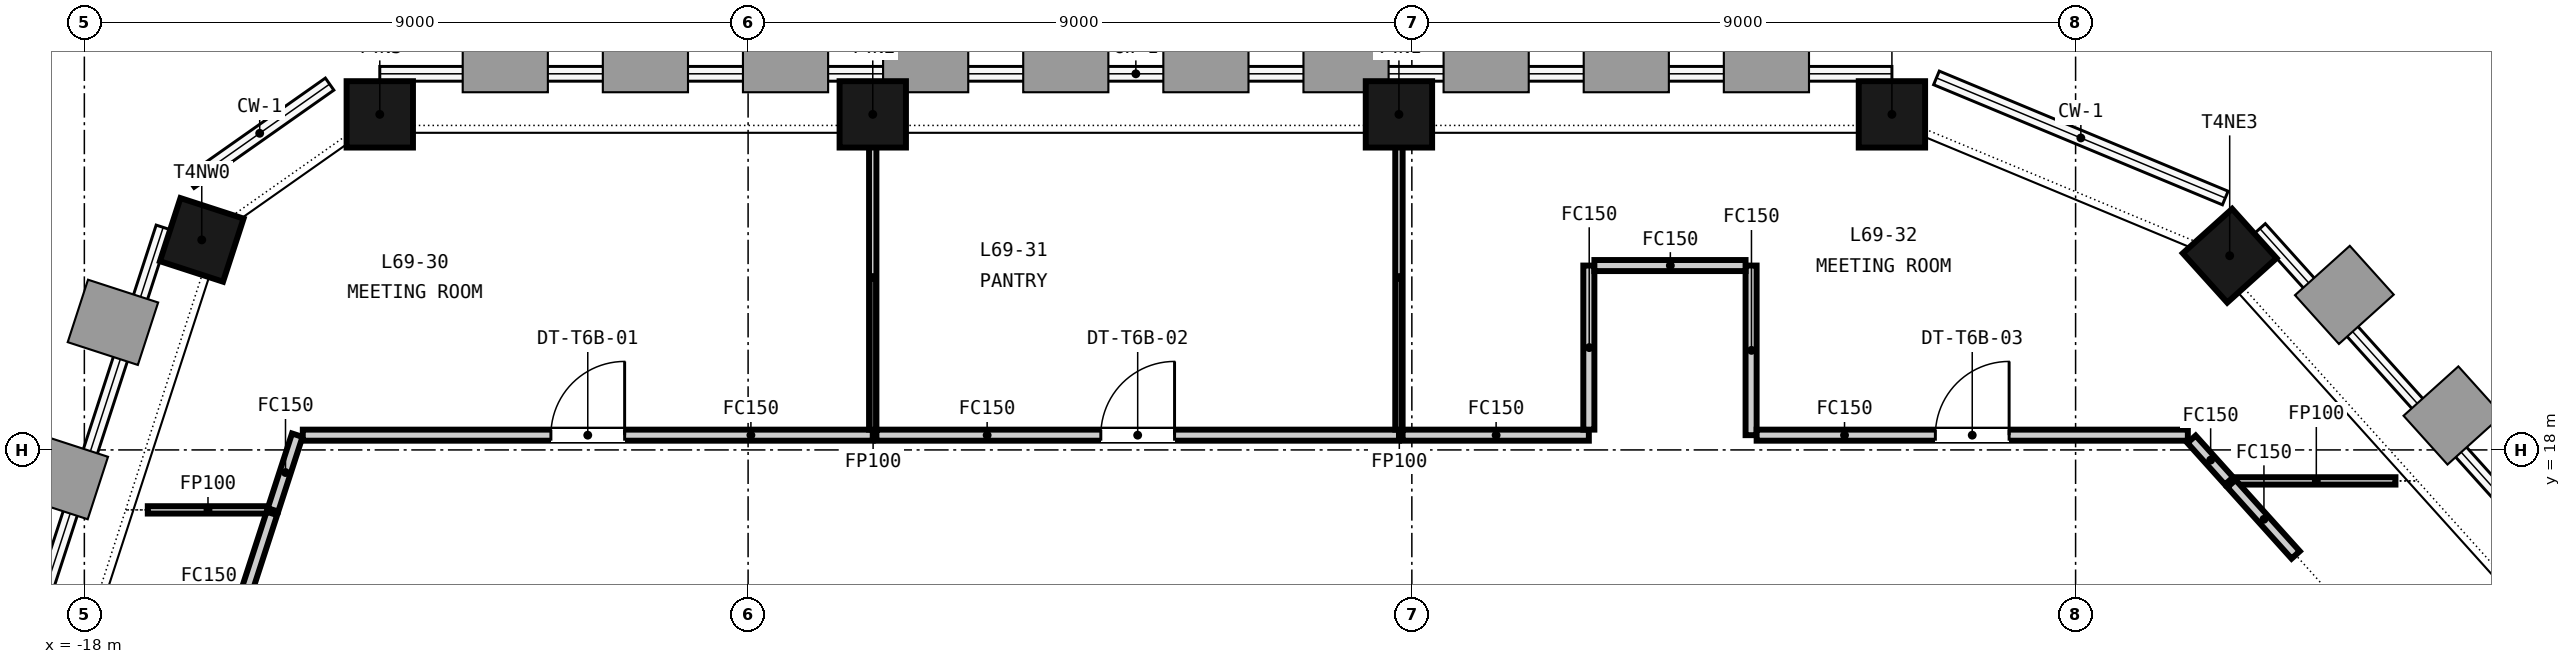
"""IFC4 building model, lengths in metres.
Left out: names, types, materials, properties, quantities, classifications, styles, units other than length and angle.
Written with IfcOpenShell. Run it as: python <this file> out.ifc"""

import sys

from ifc_helpers import new_model, si_unit, direction, frame, frame_2d, origin, origin_2d, place, context, subcontext, project, spatial, rectangle, extrude, element, fill, save


model = new_model("IFC4")
c1 = context("Model", 3, precision=1e-05, world=origin(), true_north=direction((0.0, 1.0)))
c2 = subcontext(c1, "Body", "Model", "MODEL_VIEW")
j1 = project(units=[si_unit("LENGTHUNIT", "METRE"), si_unit("PLANEANGLEUNIT", "RADIAN")], contexts=[c1])
p1 = place(None, origin())
s1 = spatial("IfcSite", under=j1, at=p1, CompositionType="ELEMENT")
p2 = place(p1, origin())
s2 = spatial("IfcBuilding", under=s1, at=p2, CompositionType="ELEMENT")
p3 = place(p2, frame((0.0, 0.0, 271.9)))
s3 = spatial("IfcBuildingStorey", under=s2, at=p3, CompositionType="ELEMENT", Elevation=271.9)
for number, where, z_axis, x_axis in (
    (1, (6.51, 22.55, -0.15), (0.0, 0.0, 1.0), (-1.0, 0.0, 0.0)),
    (2, (-0.175, 22.55, -0.15), (0.0, 0.0, 1.0), (-1.0, 0.0, 0.0)),
    (3, (-7.31, 22.55, -0.15), (0.0, 0.0, 1.0), (-1.0, 0.0, 0.0)),
    (4, (-13.994, 22.55, -0.15), (0.0, 0.0, 1.0), (-1.0, 0.0, 0.0)),
    (5, (-16.408, 20.848, -0.15), (0.0, 0.0, 1.0), (-0.309, -0.951, 0.0)),
    (6, (11.089, 20.633, -0.15), (0.0, 0.0, 1.0), (-0.669, 0.743, 0.0)),
):
    element("IfcColumn", number, at=place(p3, frame(where, z_axis=z_axis, x_axis=x_axis)), inside=s3, PredefinedType="COLUMN", context=c2, shape_type="SweptSolid", body=[
        extrude(rectangle(XDim=0.9, YDim=0.9, at=origin_2d()), origin(), (0.0, 0.0, 1.0), 3.65),
    ])
p4 = place(p3, frame((4.6, 20.5, 0.0), z_axis=(0.0, 0.0, 1.0), x_axis=(0.0, -1.0, 0.0)))
e7 = element("IfcWall", 7, at=p4, inside=s3, PredefinedType="PARTITIONING", context=c2, shape_type="SweptSolid", body=[
    extrude(rectangle(XDim=2.3, YDim=0.15, at=frame_2d((1.15, 0.0))), origin(), (0.0, 0.0, 1.0), 2.751),
])
p5 = place(p3, frame((-15.442, 17.187, 0.0), z_axis=(0.0, 0.0, 1.0), x_axis=(0.308790594164, 0.951130048393, 0.0)))
e8 = element("IfcWall", 8, at=p5, inside=s3, PredefinedType="PARTITIONING", context=c2, shape_type="SweptSolid", body=[
    extrude(rectangle(XDim=1.065, YDim=0.15, at=frame_2d((0.532, 0.0))), origin(), (0.0, 0.0, 1.0), 2.751),
])
p6 = place(p3, frame((-15.038, 18.2, 0.0), z_axis=(0.0, 0.0, 1.0), x_axis=(1.0, 0.0, 0.0)))
e9 = element("IfcWall", 9, at=p6, inside=s3, PredefinedType="PARTITIONING", context=c2, shape_type="SweptSolid", body=[
    extrude(rectangle(XDim=7.728, YDim=0.15, at=frame_2d((3.864, 0.0))), origin(), (0.0, 0.0, 1.0), 2.751),
])
p7 = place(p6, frame((3.364, 0.0, 0.0)))
e10 = element("IfcOpeningElement", 10, at=p7, cuts=e9, PredefinedType="OPENING", context=c2, shape_type="SweptSolid", body=[
    extrude(rectangle(XDim=1.0, YDim=2.1, at=frame_2d((0.5, 1.05))), frame((0.0, 0.085, 0.0), z_axis=(0.0, -1.0, 0.0), x_axis=(1.0, 0.0, 0.0)), (0.0, 0.0, 1.0), 0.17),
])
p8 = place(p3, frame((-7.31, 18.275, 0.0), z_axis=(0.0, 0.0, 1.0), x_axis=(0.0, 1.0, 0.0)))
e11 = element("IfcWall", 11, at=p8, inside=s3, PredefinedType="PARTITIONING", context=c2, shape_type="SweptSolid", body=[
    extrude(rectangle(XDim=4.125, YDim=0.1, at=frame_2d((2.062, 0.0))), origin(), (0.0, 0.0, 1.0), 2.751),
])
p9 = place(p3, frame((-17.14, 17.187, 0.0), z_axis=(0.0, 0.0, 1.0), x_axis=(1.0, 0.0, 0.0)))
e12 = element("IfcWall", 12, at=p9, inside=s3, PredefinedType="PARTITIONING", context=c2, shape_type="SweptSolid", body=[
    extrude(rectangle(XDim=1.623, YDim=0.1, at=frame_2d((0.812, 0.0))), origin(), (0.0, 0.0, 1.0), 2.751),
])
p10 = place(p3, frame((-7.26, 18.2, 0.0), z_axis=(0.0, 0.0, 1.0), x_axis=(1.0, 0.0, 0.0)))
e13 = element("IfcWall", 13, at=p10, inside=s3, PredefinedType="PARTITIONING", context=c2, shape_type="SweptSolid", body=[
    extrude(rectangle(XDim=7.085, YDim=0.15, at=frame_2d((3.542, 0.0))), origin(), (0.0, 0.0, 1.0), 2.751),
])
p11 = place(p10, frame((3.042, 0.0, 0.0)))
e14 = element("IfcOpeningElement", 14, at=p11, cuts=e13, PredefinedType="OPENING", context=c2, shape_type="SweptSolid", body=[
    extrude(rectangle(XDim=1.0, YDim=2.1, at=frame_2d((0.5, 1.05))), frame((0.0, 0.085, 0.0), z_axis=(0.0, -1.0, 0.0), x_axis=(1.0, 0.0, 0.0)), (0.0, 0.0, 1.0), 0.17),
])
p12 = place(p3, frame((-0.175, 18.275, 0.0), z_axis=(0.0, 0.0, 1.0), x_axis=(0.0, 1.0, 0.0)))
e15 = element("IfcWall", 15, at=p12, inside=s3, PredefinedType="PARTITIONING", context=c2, shape_type="SweptSolid", body=[
    extrude(rectangle(XDim=4.125, YDim=0.1, at=frame_2d((2.062, 0.0))), origin(), (0.0, 0.0, 1.0), 2.751),
])
p13 = place(p3, frame((-0.125, 18.2, 0.0), z_axis=(0.0, 0.0, 1.0), x_axis=(1.0, 0.0, 0.0)))
e16 = element("IfcWall", 16, at=p13, inside=s3, PredefinedType="PARTITIONING", context=c2, shape_type="SweptSolid", body=[
    extrude(rectangle(XDim=2.525, YDim=0.15, at=frame_2d((1.262, 0.0))), origin(), (0.0, 0.0, 1.0), 2.751),
])
p14 = place(p3, frame((2.4, 18.275, 0.0), z_axis=(0.0, 0.0, 1.0), x_axis=(0.0, 1.0, 0.0)))
e17 = element("IfcWall", 17, at=p14, inside=s3, PredefinedType="PARTITIONING", context=c2, shape_type="SweptSolid", body=[
    extrude(rectangle(XDim=2.225, YDim=0.15, at=frame_2d((1.113, 0.0))), origin(), (0.0, 0.0, 1.0), 2.751),
])
p15 = place(p3, frame((2.475, 20.5, 0.0), z_axis=(0.0, 0.0, 1.0), x_axis=(1.0, 0.0, 0.0)))
e18 = element("IfcWall", 18, at=p15, inside=s3, PredefinedType="PARTITIONING", context=c2, shape_type="SweptSolid", body=[
    extrude(rectangle(XDim=2.05, YDim=0.15, at=frame_2d((1.025, 0.0))), origin(), (0.0, 0.0, 1.0), 2.751),
])
p16 = place(p3, frame((4.675, 18.2, 0.0), z_axis=(0.0, 0.0, 1.0), x_axis=(1.0, 0.0, 0.0)))
e19 = element("IfcWall", 19, at=p16, inside=s3, PredefinedType="PARTITIONING", context=c2, shape_type="SweptSolid", body=[
    extrude(rectangle(XDim=5.847, YDim=0.15, at=frame_2d((2.923, 0.0))), origin(), (0.0, 0.0, 1.0), 2.751),
])
p17 = place(p16, frame((2.424, 0.0, 0.0)))
e20 = element("IfcOpeningElement", 20, at=p17, cuts=e19, PredefinedType="OPENING", context=c2, shape_type="SweptSolid", body=[
    extrude(rectangle(XDim=1.0, YDim=2.1, at=frame_2d((0.5, 1.05))), frame((0.0, 0.085, 0.0), z_axis=(0.0, -1.0, 0.0), x_axis=(1.0, 0.0, 0.0)), (0.0, 0.0, 1.0), 0.17),
])
p18 = place(p3, frame((10.572, 18.144, 0.0), z_axis=(0.0, 0.0, 1.0), x_axis=(0.668982500835, -0.743278153572, 0.0)))
e21 = element("IfcWall", 21, at=p18, inside=s3, PredefinedType="PARTITIONING", context=c2, shape_type="SweptSolid", body=[
    extrude(rectangle(XDim=0.759, YDim=0.15, at=frame_2d((0.379, 0.0))), origin(), (0.0, 0.0, 1.0), 2.751),
])
p19 = place(p3, frame((11.181, 17.58, 0.0), z_axis=(0.0, 0.0, 1.0), x_axis=(1.0, 0.0, 0.0)))
e22 = element("IfcWall", 22, at=p19, inside=s3, PredefinedType="PARTITIONING", context=c2, shape_type="SweptSolid", body=[
    extrude(rectangle(XDim=2.156, YDim=0.1, at=frame_2d((1.078, 0.0))), origin(), (0.0, 0.0, 1.0), 2.751),
])
p20 = place(p3, frame((11.114, 17.543, 0.0), z_axis=(0.0, 0.0, 1.0), x_axis=(0.66906841405, -0.743200818972, 0.0)))
e23 = element("IfcWall", 23, at=p20, inside=s3, PredefinedType="PARTITIONING", context=c2, shape_type="SweptSolid", body=[
    extrude(rectangle(XDim=1.301, YDim=0.15, at=frame_2d((0.65, 0.0))), origin(), (0.0, 0.0, 1.0), 2.751),
])
p21 = place(p3, frame((-17.177, 11.848, 0.0), z_axis=(0.0, 0.0, 1.0), x_axis=(0.309030503714, 0.951052126739, 0.0)))
e24 = element("IfcWall", 24, at=p21, inside=s3, PredefinedType="PARTITIONING", context=c2, shape_type="SweptSolid", body=[
    extrude(rectangle(XDim=5.563, YDim=0.15, at=frame_2d((2.782, 0.0))), origin(), (0.0, 0.0, 1.0), 2.751),
])
p22 = place(p7, origin())
e25 = element("IfcDoor", 25, at=p22, inside=s3, OperationType="SINGLE_SWING_RIGHT", PredefinedType="DOOR", context=c2, shape_type="SweptSolid", body=[
    extrude(rectangle(XDim=1.0, YDim=2.1, at=frame_2d((0.5, 1.05))), frame((0.0, 0.025, 0.0), z_axis=(0.0, -1.0, 0.0), x_axis=(1.0, 0.0, 0.0)), (0.0, 0.0, 1.0), 0.05),
])
fill(e10, e25)
p23 = place(p11, origin())
e26 = element("IfcDoor", 26, at=p23, inside=s3, OperationType="SINGLE_SWING_RIGHT", PredefinedType="DOOR", context=c2, shape_type="SweptSolid", body=[
    extrude(rectangle(XDim=1.0, YDim=2.1, at=frame_2d((0.5, 1.05))), frame((0.0, 0.025, 0.0), z_axis=(0.0, -1.0, 0.0), x_axis=(1.0, 0.0, 0.0)), (0.0, 0.0, 1.0), 0.05),
])
fill(e14, e26)
p24 = place(p17, origin())
e27 = element("IfcDoor", 27, at=p24, inside=s3, OperationType="SINGLE_SWING_RIGHT", PredefinedType="DOOR", context=c2, shape_type="SweptSolid", body=[
    extrude(rectangle(XDim=1.0, YDim=2.1, at=frame_2d((0.5, 1.05))), frame((0.0, 0.025, 0.0), z_axis=(0.0, -1.0, 0.0), x_axis=(1.0, 0.0, 0.0)), (0.0, 0.0, 1.0), 0.05),
])
fill(e20, e27)
save(model, sys.argv[1])
